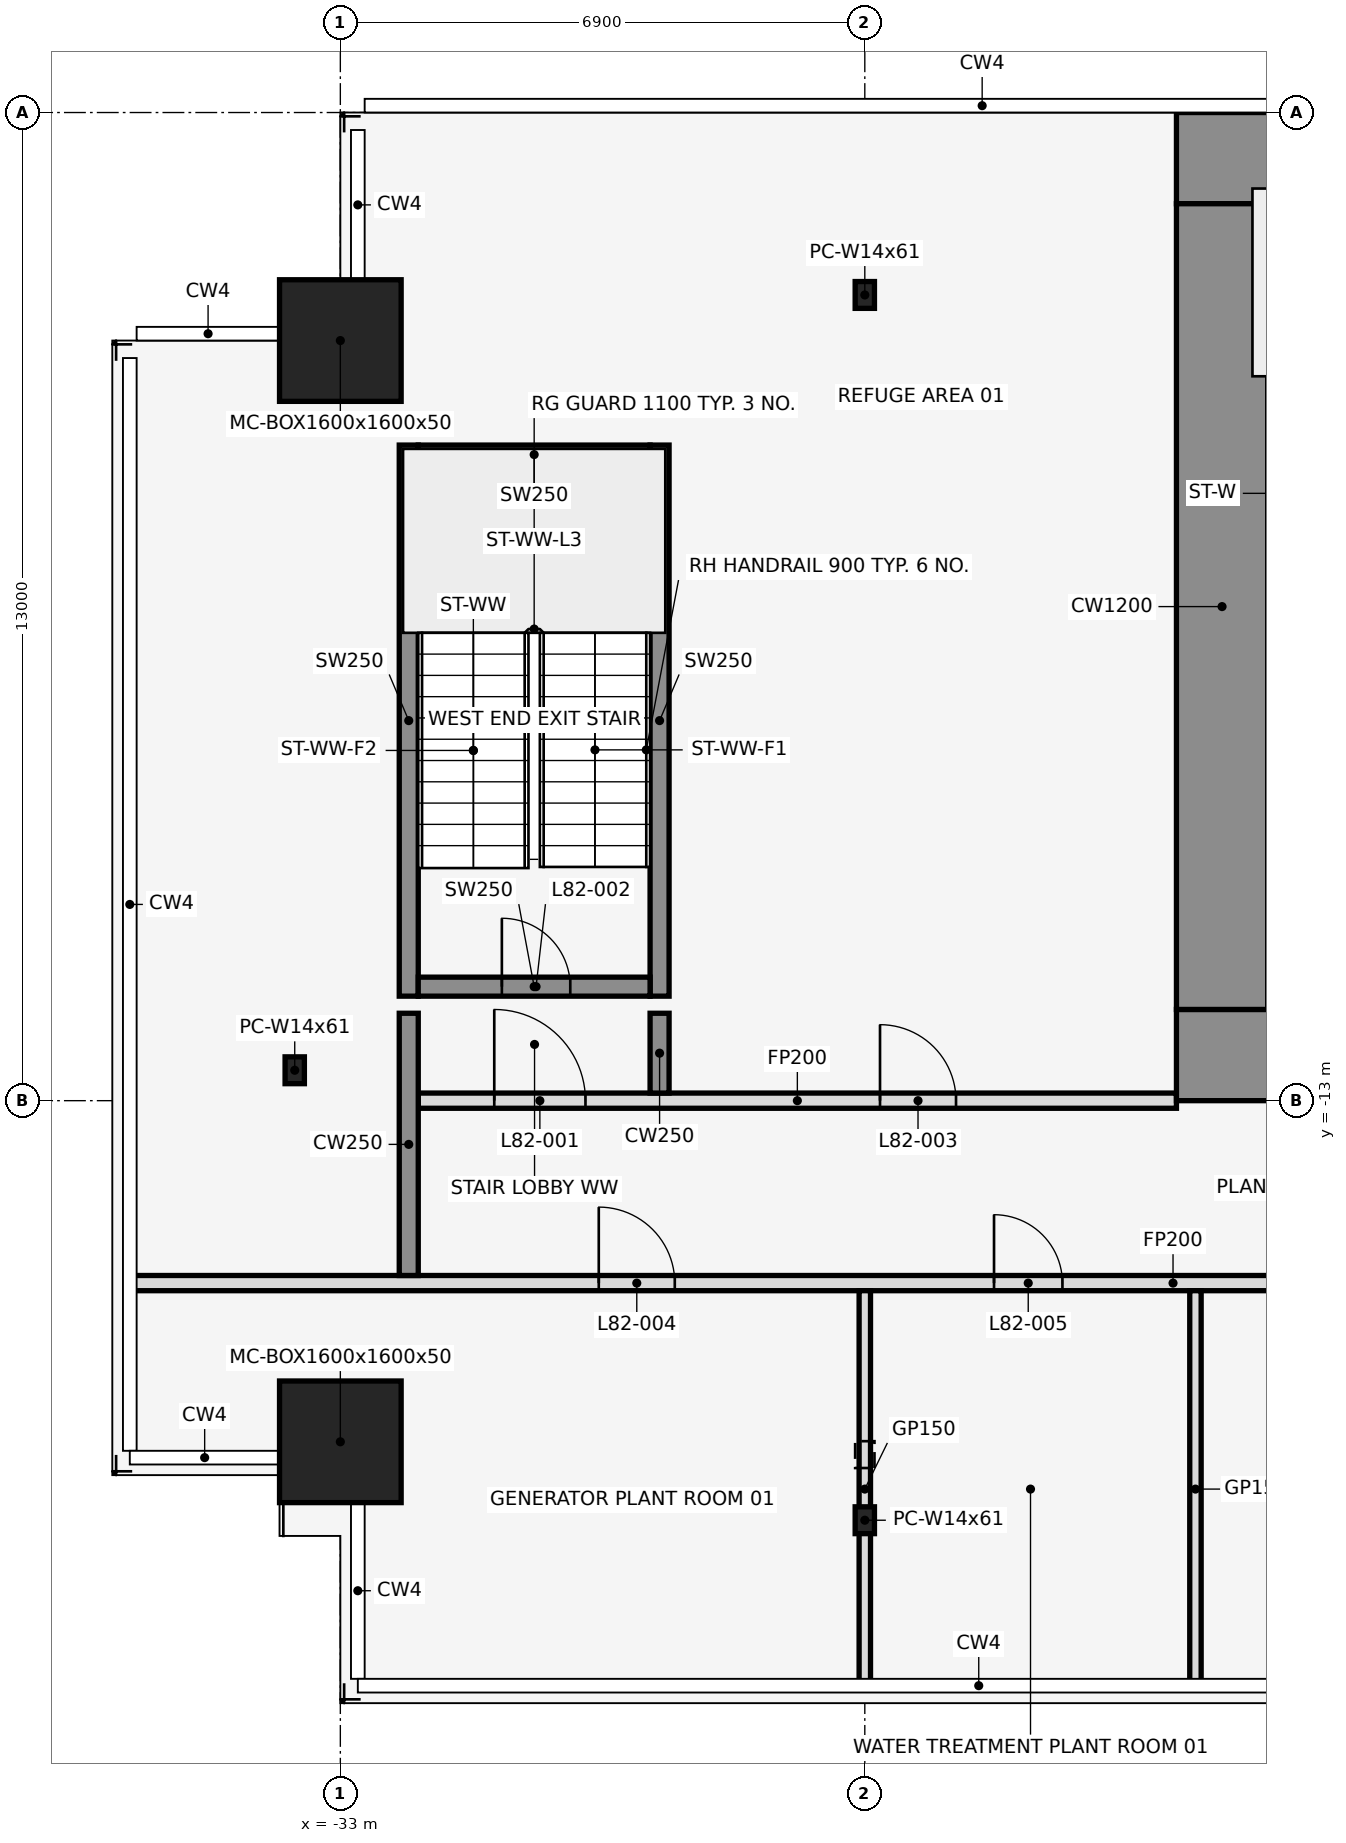
"""IFC4 building model, lengths in metres.
Left out: names, types, materials, properties, quantities, classifications, styles, units other than length and angle.
Written with IfcOpenShell. Run it as: python <this file> out.ifc"""

import sys

from ifc_helpers import new_model, si_unit, direction, frame, frame_2d, origin, origin_2d, place, context, subcontext, project, spatial, rectangle, hollow_rectangle, i_section, extrude, element, fill, save


model = new_model("IFC4")
c1 = context("Model", 3, precision=1e-05, world=origin(), true_north=direction((0.0, 1.0)))
c2 = subcontext(c1, "Body", "Model", "MODEL_VIEW")
j1 = project(units=[si_unit("LENGTHUNIT", "METRE"), si_unit("PLANEANGLEUNIT", "RADIAN")], contexts=[c1])
p1 = place(None, origin())
s1 = spatial("IfcSite", under=j1, at=p1, CompositionType="ELEMENT")
p2 = place(p1, origin())
s2 = spatial("IfcBuilding", under=s1, at=p2, CompositionType="ELEMENT")
p3 = place(p2, frame((0.0, 0.0, 365.9)))
s3 = spatial("IfcBuildingStorey", under=s2, at=p3, CompositionType="ELEMENT", Elevation=365.9)
for number, where, z_axis, x_axis in (
    (1, (-33.0, -17.488, 0.0), (0.0, 0.0, 1.0), (1.0, 0.0, 0.0)),
    (2, (-33.0, -3.0, 0.0), (0.0, 0.0, 1.0), (1.0, 0.0, 0.0)),
):
    element("IfcColumn", number, at=place(p3, frame(where, z_axis=z_axis, x_axis=x_axis)), inside=s3, PredefinedType="COLUMN", context=c2, shape_type="SweptSolid", body=[
        extrude(hollow_rectangle(XDim=1.6, YDim=1.6, WallThickness=0.05, at=origin_2d()), origin(), (0.0, 0.0, 1.0), 4.5),
    ])
p4 = place(p3, frame((-26.1, -18.52, 0.034), z_axis=(0.0, 0.191206783257, 0.981549777666), x_axis=(-1.0, 0.0, 0.0)))
e3 = element("IfcColumn", 3, at=p4, inside=s3, PredefinedType="COLUMN", context=c2, shape_type="SweptSolid", body=[
    extrude(i_section(OverallWidth=0.254, OverallDepth=0.353, WebThickness=0.01, FlangeThickness=0.016, at=origin_2d()), origin(), (0.0, 0.0, 1.0), 4.516),
])
for number, where, z_axis, x_axis in (
    (4, (-26.1, -2.4, 0.0), (0.0, 0.0, 1.0), (1.0, 0.0, 0.0)),
    (5, (-33.6, -12.6, 0.0), (0.0, 0.0, 1.0), (1.0, 0.0, 0.0)),
):
    element("IfcColumn", number, at=place(p3, frame(where, z_axis=z_axis, x_axis=x_axis)), inside=s3, PredefinedType="COLUMN", context=c2, shape_type="SweptSolid", body=[
        extrude(i_section(OverallWidth=0.254, OverallDepth=0.353, WebThickness=0.01, FlangeThickness=0.016, at=origin_2d()), origin(), (0.0, 0.0, 1.0), 4.5),
    ])
for number, where, z_axis, x_axis in (
    (6, (-32.1, -11.625, 0.0), (0.0, 0.0, 1.0), (0.0, 1.0, 0.0)),
    (7, (-28.8, -11.625, 0.0), (0.0, 0.0, 1.0), (0.0, 1.0, 0.0)),
):
    element("IfcWall", number, at=place(p3, frame(where, z_axis=z_axis, x_axis=x_axis)), inside=s3, PredefinedType="SHEAR", context=c2, shape_type="SweptSolid", body=[
        extrude(rectangle(XDim=7.25, YDim=0.25, at=frame_2d((3.625, 0.0))), origin(), (0.0, 0.0, 1.0), 4.5),
    ])
p5 = place(p3, frame((-31.975, -11.5, 0.0), z_axis=(0.0, 0.0, 1.0), x_axis=(1.0, 0.0, 0.0)))
e8 = element("IfcWall", 8, at=p5, inside=s3, PredefinedType="SHEAR", context=c2, shape_type="SweptSolid", body=[
    extrude(rectangle(XDim=3.05, YDim=0.25, at=frame_2d((1.525, 0.0))), origin(), (0.0, 0.0, 1.0), 4.5),
])
p6 = place(p5, frame((1.1, 0.0, 0.0)))
e9 = element("IfcOpeningElement", 9, at=p6, cuts=e8, PredefinedType="OPENING", context=c2, shape_type="SweptSolid", body=[
    extrude(rectangle(XDim=0.9, YDim=2.1, at=frame_2d((0.45, 1.05))), frame((0.0, 0.137, 0.0), z_axis=(0.0, -1.0, 0.0), x_axis=(1.0, 0.0, 0.0)), (0.0, 0.0, 1.0), 0.274),
])
p7 = place(p3, frame((-31.975, -4.5, 0.0), z_axis=(0.0, 0.0, 1.0), x_axis=(1.0, 0.0, 0.0)))
e10 = element("IfcWall", 10, at=p7, inside=s3, PredefinedType="SHEAR", context=c2, shape_type="SweptSolid", body=[
    extrude(rectangle(XDim=3.05, YDim=0.25, at=frame_2d((1.525, 0.0))), origin(), (0.0, 0.0, 1.0), 4.5),
])
p8 = place(p3, frame((-35.79, -15.4, 0.0), z_axis=(0.0, 0.0, 1.0), x_axis=(1.0, 0.0, 0.0)))
e11 = element("IfcWall", 11, at=p8, inside=s3, PredefinedType="PARTITIONING", context=c2, shape_type="SweptSolid", body=[
    extrude(rectangle(XDim=27.49, YDim=0.2, at=frame_2d((13.745, 0.0))), origin(), (0.0, 0.0, 1.0), 3.368),
])
p9 = place(p8, frame((6.19, 0.0, 0.0)))
e12 = element("IfcOpeningElement", 12, at=p9, cuts=e11, PredefinedType="OPENING", context=c2, shape_type="SweptSolid", body=[
    extrude(rectangle(XDim=1.0, YDim=2.1, at=frame_2d((0.5, 1.05))), frame((0.0, 0.112, 0.0), z_axis=(0.0, -1.0, 0.0), x_axis=(1.0, 0.0, 0.0)), (0.0, 0.0, 1.0), 0.224),
])
p10 = place(p8, frame((11.39, 0.0, 0.0)))
e13 = element("IfcOpeningElement", 13, at=p10, cuts=e11, PredefinedType="OPENING", context=c2, shape_type="SweptSolid", body=[
    extrude(rectangle(XDim=0.9, YDim=2.1, at=frame_2d((0.45, 1.05))), frame((0.0, 0.112, 0.0), z_axis=(0.0, -1.0, 0.0), x_axis=(1.0, 0.0, 0.0)), (0.0, 0.0, 1.0), 0.224),
])
p11 = place(p8, frame((20.04, 0.0, 0.0)))
e14 = element("IfcOpeningElement", 14, at=p11, cuts=e11, PredefinedType="OPENING", context=c2, shape_type="SweptSolid", body=[
    extrude(rectangle(XDim=1.0, YDim=2.1, at=frame_2d((0.5, 1.05))), frame((0.0, 0.112, 0.0), z_axis=(0.0, -1.0, 0.0), x_axis=(1.0, 0.0, 0.0)), (0.0, 0.0, 1.0), 0.224),
])
p12 = place(p3, frame((-31.975, -13.0, 0.0), z_axis=(0.0, 0.0, 1.0), x_axis=(1.0, 0.0, 0.0)))
e15 = element("IfcWall", 15, at=p12, inside=s3, PredefinedType="PARTITIONING", context=c2, shape_type="SweptSolid", body=[
    extrude(rectangle(XDim=9.975, YDim=0.2, at=frame_2d((4.988, 0.0))), origin(), (0.0, 0.0, 1.0), 3.368),
])
p13 = place(p12, frame((1.0, 0.0, 0.0)))
e16 = element("IfcOpeningElement", 16, at=p13, cuts=e15, PredefinedType="OPENING", context=c2, shape_type="SweptSolid", body=[
    extrude(rectangle(XDim=1.2, YDim=2.1, at=frame_2d((0.6, 1.05))), frame((0.0, 0.112, 0.0), z_axis=(0.0, -1.0, 0.0), x_axis=(1.0, 0.0, 0.0)), (0.0, 0.0, 1.0), 0.224),
])
p14 = place(p12, frame((6.075, 0.0, 0.0)))
e17 = element("IfcOpeningElement", 17, at=p14, cuts=e15, PredefinedType="OPENING", context=c2, shape_type="SweptSolid", body=[
    extrude(rectangle(XDim=1.0, YDim=2.1, at=frame_2d((0.5, 1.05))), frame((0.0, 0.112, 0.0), z_axis=(0.0, -1.0, 0.0), x_axis=(1.0, 0.0, 0.0)), (0.0, 0.0, 1.0), 0.224),
])
p15 = place(p3, frame((-32.1, -15.3, 0.0), z_axis=(0.0, 0.0, 1.0), x_axis=(0.0, 1.0, 0.0)))
e18 = element("IfcWall", 18, at=p15, inside=s3, PredefinedType="SHEAR", context=c2, shape_type="SweptSolid", body=[
    extrude(rectangle(XDim=3.45, YDim=0.25, at=frame_2d((1.725, 0.0))), origin(), (0.0, 0.0, 1.0), 4.5),
])
p16 = place(p3, frame((-28.8, -12.9, 0.0), z_axis=(0.0, 0.0, 1.0), x_axis=(0.0, 1.0, 0.0)))
e19 = element("IfcWall", 19, at=p16, inside=s3, PredefinedType="SHEAR", context=c2, shape_type="SweptSolid", body=[
    extrude(rectangle(XDim=1.05, YDim=0.25, at=frame_2d((0.525, 0.0))), origin(), (0.0, 0.0, 1.0), 4.5),
])
for number, where, z_axis, x_axis in (
    (20, (-26.1, -20.72, 0.0), (0.0, 0.0, 1.0), (0.0, 1.0, 0.0)),
    (21, (-21.75, -20.72, 0.0), (0.0, 0.0, 1.0), (0.0, 1.0, 0.0)),
):
    element("IfcWall", number, at=place(p3, frame(where, z_axis=z_axis, x_axis=x_axis)), inside=s3, PredefinedType="PARTITIONING", context=c2, shape_type="SweptSolid", body=[
        extrude(rectangle(XDim=5.22, YDim=0.15, at=frame_2d((2.61, 0.0))), origin(), (0.0, 0.0, 1.0), 3.368),
    ])
p17 = place(p3, frame((-22.0, -0.6, 0.0), z_axis=(0.0, 0.0, 1.0), x_axis=(1.0, 0.0, 0.0)))
e22 = element("IfcWall", 22, at=p17, inside=s3, PredefinedType="SHEAR", context=c2, shape_type="SweptSolid", body=[
    extrude(rectangle(XDim=13.7, YDim=1.2, at=frame_2d((6.85, 0.0))), origin(), (0.0, 0.0, 1.0), 4.5),
])
p18 = place(p3, frame((-22.0, -12.4, 0.0), z_axis=(0.0, 0.0, 1.0), x_axis=(1.0, 0.0, 0.0)))
e23 = element("IfcWall", 23, at=p18, inside=s3, PredefinedType="SHEAR", context=c2, shape_type="SweptSolid", body=[
    extrude(rectangle(XDim=13.7, YDim=1.2, at=frame_2d((6.85, 0.0))), origin(), (0.0, 0.0, 1.0), 4.5),
])
p19 = place(p18, frame((2.2, 0.0, 0.0)))
e24 = element("IfcOpeningElement", 24, at=p19, cuts=e23, PredefinedType="OPENING", context=c2, shape_type="SweptSolid", body=[
    extrude(rectangle(XDim=1.2, YDim=2.1, at=frame_2d((0.6, 1.05))), frame((0.0, 0.612, 0.0), z_axis=(0.0, -1.0, 0.0), x_axis=(1.0, 0.0, 0.0)), (0.0, 0.0, 1.0), 1.224),
])
p20 = place(p18, frame((10.75, 0.0, 0.0)))
e25 = element("IfcOpeningElement", 25, at=p20, cuts=e23, PredefinedType="OPENING", context=c2, shape_type="SweptSolid", body=[
    extrude(rectangle(XDim=1.2, YDim=2.1, at=frame_2d((0.6, 1.05))), frame((0.0, 0.612, 0.0), z_axis=(0.0, -1.0, 0.0), x_axis=(1.0, 0.0, 0.0)), (0.0, 0.0, 1.0), 1.224),
])
p21 = place(p18, frame((6.3, 0.0, 0.0)))
e26 = element("IfcOpeningElement", 26, at=p21, cuts=e23, PredefinedType="OPENING", context=c2, shape_type="SweptSolid", body=[
    extrude(rectangle(XDim=1.2, YDim=2.1, at=frame_2d((0.6, 1.05))), frame((0.0, 0.612, 0.0), z_axis=(0.0, -1.0, 0.0), x_axis=(1.0, 0.0, 0.0)), (0.0, 0.0, 1.0), 1.224),
])
p22 = place(p3, frame((-21.4, -11.8, 0.0), z_axis=(0.0, 0.0, 1.0), x_axis=(0.0, 1.0, 0.0)))
e27 = element("IfcWall", 27, at=p22, inside=s3, PredefinedType="SHEAR", context=c2, shape_type="SweptSolid", body=[
    extrude(rectangle(XDim=10.6, YDim=1.2, at=frame_2d((5.3, 0.0))), origin(), (0.0, 0.0, 1.0), 4.5),
])
p23 = place(p13, origin())
e28 = element("IfcDoor", 28, at=p23, inside=s3, OperationType="SINGLE_SWING_LEFT", PredefinedType="DOOR", context=c2, shape_type="SweptSolid", body=[
    extrude(rectangle(XDim=1.2, YDim=2.1, at=frame_2d((0.6, 1.05))), frame((0.0, 0.025, 0.0), z_axis=(0.0, -1.0, 0.0), x_axis=(1.0, 0.0, 0.0)), (0.0, 0.0, 1.0), 0.05),
])
fill(e16, e28)
p24 = place(p6, origin())
e29 = element("IfcDoor", 29, at=p24, inside=s3, OperationType="SINGLE_SWING_LEFT", PredefinedType="DOOR", context=c2, shape_type="SweptSolid", body=[
    extrude(rectangle(XDim=0.9, YDim=2.1, at=frame_2d((0.45, 1.05))), frame((0.0, 0.025, 0.0), z_axis=(0.0, -1.0, 0.0), x_axis=(1.0, 0.0, 0.0)), (0.0, 0.0, 1.0), 0.05),
])
fill(e9, e29)
p25 = place(p14, origin())
e30 = element("IfcDoor", 30, at=p25, inside=s3, OperationType="SINGLE_SWING_RIGHT", PredefinedType="DOOR", context=c2, shape_type="SweptSolid", body=[
    extrude(rectangle(XDim=1.0, YDim=2.1, at=frame_2d((0.5, 1.05))), frame((0.0, 0.025, 0.0), z_axis=(0.0, -1.0, 0.0), x_axis=(1.0, 0.0, 0.0)), (0.0, 0.0, 1.0), 0.05),
])
fill(e17, e30)
p26 = place(p9, frame((1.0, 0.0, 0.0), z_axis=(0.0, 0.0, 1.0), x_axis=(-1.0, 0.0, 0.0)))
e31 = element("IfcDoor", 31, at=p26, inside=s3, OperationType="SINGLE_SWING_LEFT", PredefinedType="DOOR", context=c2, shape_type="SweptSolid", body=[
    extrude(rectangle(XDim=1.0, YDim=2.1, at=frame_2d((0.5, 1.05))), frame((0.0, 0.025, 0.0), z_axis=(0.0, -1.0, 0.0), x_axis=(1.0, 0.0, 0.0)), (0.0, 0.0, 1.0), 0.05),
])
fill(e12, e31)
p27 = place(p10, frame((0.9, 0.0, 0.0), z_axis=(0.0, 0.0, 1.0), x_axis=(-1.0, 0.0, 0.0)))
e32 = element("IfcDoor", 32, at=p27, inside=s3, OperationType="SINGLE_SWING_RIGHT", PredefinedType="DOOR", context=c2, shape_type="SweptSolid", body=[
    extrude(rectangle(XDim=0.9, YDim=2.1, at=frame_2d((0.45, 1.05))), frame((0.0, 0.025, 0.0), z_axis=(0.0, -1.0, 0.0), x_axis=(1.0, 0.0, 0.0)), (0.0, 0.0, 1.0), 0.05),
])
fill(e13, e32)
save(model, sys.argv[1])
